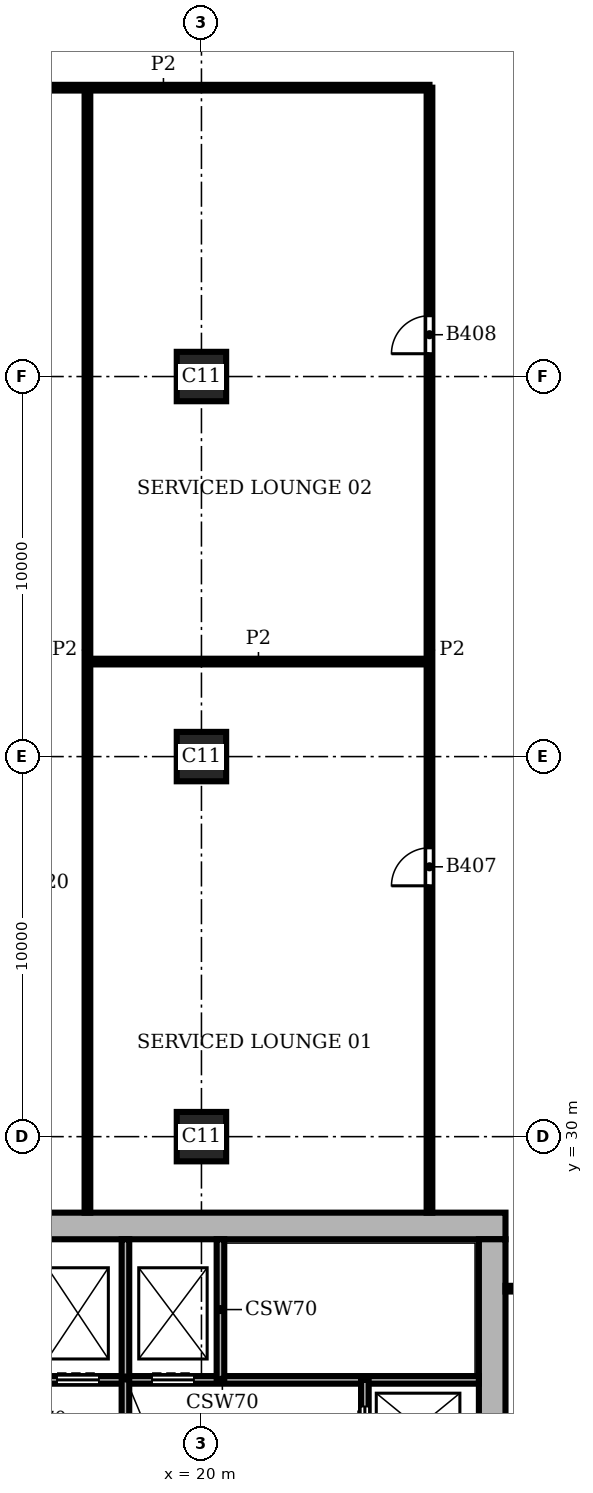
"""IFC4 building model, lengths in metres.
Left out: names, types, materials, properties, quantities, classifications, styles, units other than length and angle.
Written with IfcOpenShell. Run it as: python <this file> out.ifc"""

import sys

from ifc_helpers import new_model, si_unit, direction, frame, frame_2d, origin, origin_2d, place, context, subcontext, project, spatial, rectangle, extrude, element, fill, save


model = new_model("IFC4")
c1 = context("Model", 3, precision=1e-05, world=origin(), true_north=direction((0.0, 1.0)))
c2 = subcontext(c1, "Body", "Model", "MODEL_VIEW")
j1 = project(units=[si_unit("LENGTHUNIT", "METRE"), si_unit("PLANEANGLEUNIT", "RADIAN")], contexts=[c1])
p1 = place(None, origin())
s1 = spatial("IfcSite", under=j1, at=p1, CompositionType="ELEMENT")
p2 = place(p1, origin())
s2 = spatial("IfcBuilding", under=s1, at=p2, CompositionType="ELEMENT")
p3 = place(p2, frame((0.0, 0.0, 170.7)))
s3 = spatial("IfcBuildingStorey", under=s2, at=p3, CompositionType="ELEMENT", Elevation=170.7)
for number, where, z_axis, x_axis in (
    (1, (20.0, 30.0, 0.0), (0.0, 0.0, 1.0), (1.0, 0.0, 0.0)),
    (2, (20.0, 40.0, 0.0), (0.0, 0.0, 1.0), (1.0, 0.0, 0.0)),
    (3, (20.0, 50.0, 0.0), (0.0, 0.0, 1.0), (1.0, 0.0, 0.0)),
):
    element("IfcColumn", number, at=place(p3, frame(where, z_axis=z_axis, x_axis=x_axis)), inside=s3, PredefinedType="COLUMN", context=c2, shape_type="SweptSolid", body=[
        extrude(rectangle(XDim=1.3, YDim=1.3, at=origin_2d()), origin(), (0.0, 0.0, 1.0), 3.9),
    ])
p4 = place(p3, frame((27.65, 8.7, 0.0), z_axis=(0.0, 0.0, 1.0), x_axis=(0.0, 1.0, 0.0)))
e4 = element("IfcWall", 4, at=p4, inside=s3, PredefinedType="SHEAR", context=c2, shape_type="SweptSolid", body=[
    extrude(rectangle(XDim=18.6, YDim=0.7, at=frame_2d((9.3, 0.0))), origin(), (0.0, 0.0, 1.0), 3.9),
])
p5 = place(p4, frame((4.75, 0.0, 0.0)))
e5 = element("IfcOpeningElement", 5, at=p5, cuts=e4, PredefinedType="OPENING", context=c2, shape_type="SweptSolid", body=[
    extrude(rectangle(XDim=1.6, YDim=2.1, at=frame_2d((0.8, 1.05))), frame((0.0, 0.36, 0.0), z_axis=(0.0, -1.0, 0.0), x_axis=(1.0, 0.0, 0.0)), (0.0, 0.0, 1.0), 0.72),
])
p6 = place(p3, frame((28.0, 27.65, 0.0), z_axis=(0.0, 0.0, 1.0), x_axis=(-1.0, 0.0, 0.0)))
e6 = element("IfcWall", 6, at=p6, inside=s3, PredefinedType="SHEAR", context=c2, shape_type="SweptSolid", body=[
    extrude(rectangle(XDim=20.0, YDim=0.7, at=frame_2d((10.0, 0.0))), origin(), (0.0, 0.0, 1.0), 3.9),
])
p7 = place(p3, frame((13.8, 23.6, 0.0), z_axis=(0.0, 0.0, 1.0), x_axis=(1.0, 0.0, 0.0)))
e7 = element("IfcWall", 7, at=p7, inside=s3, PredefinedType="SHEAR", context=c2, shape_type="SweptSolid", body=[
    extrude(rectangle(XDim=13.5, YDim=0.2, at=frame_2d((6.75, 0.0))), origin(), (0.0, 0.0, 1.0), 3.58),
])
p8 = place(p7, frame((2.4, 0.0, 0.0)))
e8 = element("IfcOpeningElement", 8, at=p8, cuts=e7, PredefinedType="OPENING", context=c2, shape_type="SweptSolid", body=[
    extrude(rectangle(XDim=1.1, YDim=2.1, at=frame_2d((0.55, 1.05))), frame((0.0, 0.11, 0.0), z_axis=(0.0, -1.0, 0.0), x_axis=(1.0, 0.0, 0.0)), (0.0, 0.0, 1.0), 0.22),
])
p9 = place(p7, frame((4.9, 0.0, 0.0)))
e9 = element("IfcOpeningElement", 9, at=p9, cuts=e7, PredefinedType="OPENING", context=c2, shape_type="SweptSolid", body=[
    extrude(rectangle(XDim=1.1, YDim=2.1, at=frame_2d((0.55, 1.05))), frame((0.0, 0.11, 0.0), z_axis=(0.0, -1.0, 0.0), x_axis=(1.0, 0.0, 0.0)), (0.0, 0.0, 1.0), 0.22),
])
p10 = place(p7, frame((0.2, 0.0, 0.0)))
e10 = element("IfcOpeningElement", 10, at=p10, cuts=e7, PredefinedType="OPENING", context=c2, shape_type="SweptSolid", body=[
    extrude(rectangle(XDim=1.0, YDim=2.1, at=frame_2d((0.5, 1.05))), frame((0.0, 0.11, 0.0), z_axis=(0.0, -1.0, 0.0), x_axis=(1.0, 0.0, 0.0)), (0.0, 0.0, 1.0), 0.22),
])
p11 = place(p3, frame((18.0, 20.0, 0.0), z_axis=(0.0, 0.0, 1.0), x_axis=(0.0, 1.0, 0.0)))
e11 = element("IfcWall", 11, at=p11, inside=s3, PredefinedType="SHEAR", context=c2, shape_type="SweptSolid", body=[
    extrude(rectangle(XDim=7.3, YDim=0.2, at=frame_2d((3.65, 0.0))), origin(), (0.0, 0.0, 1.0), 3.58),
])
p12 = place(p11, frame((1.2, 0.0, 0.0)))
e12 = element("IfcOpeningElement", 12, at=p12, cuts=e11, PredefinedType="OPENING", context=c2, shape_type="SweptSolid", body=[
    extrude(rectangle(XDim=1.2, YDim=2.1, at=frame_2d((0.6, 1.05))), frame((0.0, 0.11, 0.0), z_axis=(0.0, -1.0, 0.0), x_axis=(1.0, 0.0, 0.0)), (0.0, 0.0, 1.0), 0.22),
])
p13 = place(p3, frame((20.5, 23.6, 0.0), z_axis=(0.0, 0.0, 1.0), x_axis=(0.0, 1.0, 0.0)))
e13 = element("IfcWall", 13, at=p13, inside=s3, PredefinedType="SHEAR", context=c2, shape_type="SweptSolid", body=[
    extrude(rectangle(XDim=3.7, YDim=0.2, at=frame_2d((1.85, 0.0))), origin(), (0.0, 0.0, 1.0), 3.58),
])
p14 = place(p3, frame((24.3, 16.1, 0.0), z_axis=(0.0, 0.0, 1.0), x_axis=(0.0, 1.0, 0.0)))
e14 = element("IfcWall", 14, at=p14, inside=s3, PredefinedType="SHEAR", context=c2, shape_type="SweptSolid", body=[
    extrude(rectangle(XDim=7.5, YDim=0.2, at=frame_2d((3.75, 0.0))), origin(), (0.0, 0.0, 1.0), 3.58),
])
p15 = place(p14, frame((5.7, 0.0, 0.0)))
e15 = element("IfcOpeningElement", 15, at=p15, cuts=e14, PredefinedType="OPENING", context=c2, shape_type="SweptSolid", body=[
    extrude(rectangle(XDim=1.1, YDim=2.1, at=frame_2d((0.55, 1.05))), frame((0.0, 0.11, 0.0), z_axis=(0.0, -1.0, 0.0), x_axis=(1.0, 0.0, 0.0)), (0.0, 0.0, 1.0), 0.22),
])
p16 = place(p3, frame((17.0, 28.0, 0.0), z_axis=(0.0, 0.0, 1.0), x_axis=(0.0, 1.0, 0.0)))
e16 = element("IfcWall", 16, at=p16, inside=s3, PredefinedType="PARTITIONING", context=c2, shape_type="SweptSolid", body=[
    extrude(rectangle(XDim=29.6, YDim=0.15, at=frame_2d((14.8, 0.0))), origin(), (0.0, 0.0, 1.0), 3.58),
])
p17 = place(p3, frame((26.0, 28.0, 0.0), z_axis=(0.0, 0.0, 1.0), x_axis=(0.0, 1.0, 0.0)))
e17 = element("IfcWall", 17, at=p17, inside=s3, PredefinedType="PARTITIONING", context=c2, shape_type="SweptSolid", body=[
    extrude(rectangle(XDim=29.6, YDim=0.15, at=frame_2d((14.8, 0.0))), origin(), (0.0, 0.0, 1.0), 3.58),
])
p18 = place(p17, frame((8.6, 0.0, 0.0)))
e18 = element("IfcOpeningElement", 18, at=p18, cuts=e17, PredefinedType="OPENING", context=c2, shape_type="SweptSolid", body=[
    extrude(rectangle(XDim=1.0, YDim=2.1, at=frame_2d((0.5, 1.05))), frame((0.0, 0.085, 0.0), z_axis=(0.0, -1.0, 0.0), x_axis=(1.0, 0.0, 0.0)), (0.0, 0.0, 1.0), 0.17),
])
p19 = place(p17, frame((22.6, 0.0, 0.0)))
e19 = element("IfcOpeningElement", 19, at=p19, cuts=e17, PredefinedType="OPENING", context=c2, shape_type="SweptSolid", body=[
    extrude(rectangle(XDim=1.0, YDim=2.1, at=frame_2d((0.5, 1.05))), frame((0.0, 0.085, 0.0), z_axis=(0.0, -1.0, 0.0), x_axis=(1.0, 0.0, 0.0)), (0.0, 0.0, 1.0), 0.17),
])
p20 = place(p3, frame((28.0, 26.0, 0.0), z_axis=(0.0, 0.0, 1.0), x_axis=(1.0, 0.0, 0.0)))
e20 = element("IfcWall", 20, at=p20, inside=s3, PredefinedType="PARTITIONING", context=c2, shape_type="SweptSolid", body=[
    extrude(rectangle(XDim=2.8, YDim=0.15, at=frame_2d((1.4, 0.0))), origin(), (0.0, 0.0, 1.0), 3.58),
])
p21 = place(p3, frame((17.0, 42.5, 0.0), z_axis=(0.0, 0.0, 1.0), x_axis=(1.0, 0.0, 0.0)))
e21 = element("IfcWall", 21, at=p21, inside=s3, PredefinedType="PARTITIONING", context=c2, shape_type="SweptSolid", body=[
    extrude(rectangle(XDim=9.0, YDim=0.15, at=frame_2d((4.5, 0.0))), origin(), (0.0, 0.0, 1.0), 3.58),
])
p22 = place(p3, frame((12.0, 57.6, 0.0), z_axis=(0.0, 0.0, 1.0), x_axis=(1.0, 0.0, 0.0)))
e22 = element("IfcWall", 22, at=p22, inside=s3, PredefinedType="PARTITIONING", context=c2, shape_type="SweptSolid", body=[
    extrude(rectangle(XDim=14.0, YDim=0.15, at=frame_2d((7.0, 0.0))), origin(), (0.0, 0.0, 1.0), 3.58),
])
p23 = place(p22, frame((1.85, 0.0, 0.0)))
e23 = element("IfcOpeningElement", 23, at=p23, cuts=e22, PredefinedType="OPENING", context=c2, shape_type="SweptSolid", body=[
    extrude(rectangle(XDim=1.8, YDim=2.1, at=frame_2d((0.9, 1.05))), frame((0.0, 0.085, 0.0), z_axis=(0.0, -1.0, 0.0), x_axis=(1.0, 0.0, 0.0)), (0.0, 0.0, 1.0), 0.17),
])
p24 = place(p15, origin())
e24 = element("IfcDoor", 24, at=p24, inside=s3, OperationType="DOUBLE_DOOR_SLIDING", PredefinedType="DOOR", context=c2, shape_type="SweptSolid", body=[
    extrude(rectangle(XDim=1.1, YDim=2.1, at=frame_2d((0.55, 1.05))), frame((0.0, 0.025, 0.0), z_axis=(0.0, -1.0, 0.0), x_axis=(1.0, 0.0, 0.0)), (0.0, 0.0, 1.0), 0.05),
])
fill(e15, e24)
p25 = place(p8, origin())
e25 = element("IfcDoor", 25, at=p25, inside=s3, OperationType="DOUBLE_DOOR_SLIDING", PredefinedType="DOOR", context=c2, shape_type="SweptSolid", body=[
    extrude(rectangle(XDim=1.1, YDim=2.1, at=frame_2d((0.55, 1.05))), frame((0.0, 0.025, 0.0), z_axis=(0.0, -1.0, 0.0), x_axis=(1.0, 0.0, 0.0)), (0.0, 0.0, 1.0), 0.05),
])
fill(e8, e25)
p26 = place(p9, origin())
e26 = element("IfcDoor", 26, at=p26, inside=s3, OperationType="DOUBLE_DOOR_SLIDING", PredefinedType="DOOR", context=c2, shape_type="SweptSolid", body=[
    extrude(rectangle(XDim=1.1, YDim=2.1, at=frame_2d((0.55, 1.05))), frame((0.0, 0.025, 0.0), z_axis=(0.0, -1.0, 0.0), x_axis=(1.0, 0.0, 0.0)), (0.0, 0.0, 1.0), 0.05),
])
fill(e9, e26)
p27 = place(p18, origin())
e27 = element("IfcDoor", 27, at=p27, inside=s3, OperationType="SINGLE_SWING_LEFT", PredefinedType="DOOR", context=c2, shape_type="SweptSolid", body=[
    extrude(rectangle(XDim=1.0, YDim=2.1, at=frame_2d((0.5, 1.05))), frame((0.0, 0.025, 0.0), z_axis=(0.0, -1.0, 0.0), x_axis=(1.0, 0.0, 0.0)), (0.0, 0.0, 1.0), 0.05),
])
fill(e18, e27)
p28 = place(p19, origin())
e28 = element("IfcDoor", 28, at=p28, inside=s3, OperationType="SINGLE_SWING_LEFT", PredefinedType="DOOR", context=c2, shape_type="SweptSolid", body=[
    extrude(rectangle(XDim=1.0, YDim=2.1, at=frame_2d((0.5, 1.05))), frame((0.0, 0.025, 0.0), z_axis=(0.0, -1.0, 0.0), x_axis=(1.0, 0.0, 0.0)), (0.0, 0.0, 1.0), 0.05),
])
fill(e19, e28)
save(model, sys.argv[1])
